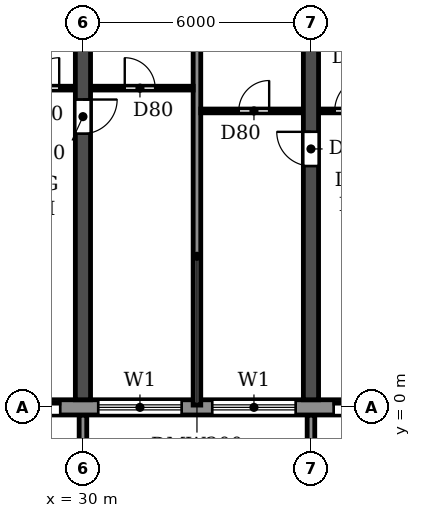
"""IFC4 building model, lengths in metres.
Left out: names, types, materials, properties, quantities, classifications, styles, units other than length and angle.
Written with IfcOpenShell. Run it as: python <this file> out.ifc"""

import sys

from ifc_helpers import new_model, si_unit, direction, frame, frame_2d, origin, place, context, subcontext, project, spatial, polyline, rectangle, outline, extrude, source, transform, mapped, element, fill, save


model = new_model("IFC4")
c1 = context("Model", 3, precision=1e-05, world=origin(), true_north=direction((0.0, 1.0)))
c2 = subcontext(c1, "Body", "Model", "MODEL_VIEW")
j1 = project(units=[si_unit("LENGTHUNIT", "METRE"), si_unit("PLANEANGLEUNIT", "RADIAN")], contexts=[c1])
p1 = place(None, origin())
s1 = spatial("IfcSite", under=j1, at=p1, CompositionType="ELEMENT")
p2 = place(p1, origin())
s2 = spatial("IfcBuilding", under=s1, at=p2, CompositionType="ELEMENT")
p3 = place(p2, frame((0.0, 0.0, 63.0)))
s3 = spatial("IfcBuildingStorey", under=s2, at=p3, CompositionType="ELEMENT", Elevation=63.0)
p4 = place(p3, frame((30.0, 0.2, 0.0), z_axis=(0.0, 0.0, 1.0), x_axis=(0.0, 1.0, 0.0)))
e1 = element("IfcWall", 1, at=p4, inside=s3, PredefinedType="SHEAR", context=c2, shape_type="SweptSolid", body=[
    extrude(rectangle(XDim=11.65, YDim=0.4, at=frame_2d((5.825, 0.0))), origin(), (0.0, 0.0, 1.0), 2.95),
])
p5 = place(p4, frame((7.0, 0.0, 0.0)))
e2 = element("IfcOpeningElement", 2, at=p5, cuts=e1, PredefinedType="OPENING", context=c2, shape_type="SweptSolid", body=[
    extrude(rectangle(XDim=0.9, YDim=2.1, at=frame_2d((0.45, 1.05))), frame((0.0, 0.21, 0.0), z_axis=(0.0, -1.0, 0.0), x_axis=(1.0, 0.0, 0.0)), (0.0, 0.0, 1.0), 0.42),
])
p6 = place(p3, frame((36.0, 0.2, 0.0), z_axis=(0.0, 0.0, 1.0), x_axis=(0.0, 1.0, 0.0)))
e3 = element("IfcWall", 3, at=p6, inside=s3, PredefinedType="SHEAR", context=c2, shape_type="SweptSolid", body=[
    extrude(rectangle(XDim=11.65, YDim=0.4, at=frame_2d((5.825, 0.0))), origin(), (0.0, 0.0, 1.0), 2.95),
])
p7 = place(p6, frame((6.15, 0.0, 0.0)))
e4 = element("IfcOpeningElement", 4, at=p7, cuts=e3, PredefinedType="OPENING", context=c2, shape_type="SweptSolid", body=[
    extrude(rectangle(XDim=0.9, YDim=2.1, at=frame_2d((0.45, 1.05))), frame((0.0, 0.21, 0.0), z_axis=(0.0, -1.0, 0.0), x_axis=(1.0, 0.0, 0.0)), (0.0, 0.0, 1.0), 0.42),
])
p8 = place(p3, frame((10.683, 0.0, 0.0), z_axis=(0.0, 0.0, 1.0), x_axis=(1.0, 0.0, 0.0)))
e5 = element("IfcWall", 5, at=p8, inside=s3, PredefinedType="STANDARD", context=c2, shape_type="SweptSolid", body=[
    extrude(rectangle(XDim=80.634, YDim=0.4, at=frame_2d((40.317, 0.0))), origin(), (0.0, 0.0, 1.0), 2.95),
])
p9 = place(p8, frame((1.717, 0.0, 0.9)))
e6 = element("IfcOpeningElement", 6, at=p9, cuts=e5, PredefinedType="OPENING", context=c2, shape_type="SweptSolid", body=[
    extrude(rectangle(XDim=2.2, YDim=1.5, at=frame_2d((1.1, 0.75))), frame((0.0, 0.21, 0.0), z_axis=(0.0, -1.0, 0.0), x_axis=(1.0, 0.0, 0.0)), (0.0, 0.0, 1.0), 0.42),
])
p10 = place(p8, frame((4.917, 0.0, 0.0)))
e7 = element("IfcOpeningElement", 7, at=p10, cuts=e5, PredefinedType="OPENING", context=c2, shape_type="SweptSolid", body=[
    extrude(rectangle(XDim=1.8, YDim=2.4, at=frame_2d((0.9, 1.2))), frame((0.0, 0.21, 0.0), z_axis=(0.0, -1.0, 0.0), x_axis=(1.0, 0.0, 0.0)), (0.0, 0.0, 1.0), 0.42),
])
p11 = place(p8, frame((7.717, 0.0, 0.9)))
e8 = element("IfcOpeningElement", 8, at=p11, cuts=e5, PredefinedType="OPENING", context=c2, shape_type="SweptSolid", body=[
    extrude(rectangle(XDim=2.2, YDim=1.5, at=frame_2d((1.1, 0.75))), frame((0.0, 0.21, 0.0), z_axis=(0.0, -1.0, 0.0), x_axis=(1.0, 0.0, 0.0)), (0.0, 0.0, 1.0), 0.42),
])
p12 = place(p8, frame((10.717, 0.0, 0.9)))
e9 = element("IfcOpeningElement", 9, at=p12, cuts=e5, PredefinedType="OPENING", context=c2, shape_type="SweptSolid", body=[
    extrude(rectangle(XDim=2.2, YDim=1.5, at=frame_2d((1.1, 0.75))), frame((0.0, 0.21, 0.0), z_axis=(0.0, -1.0, 0.0), x_axis=(1.0, 0.0, 0.0)), (0.0, 0.0, 1.0), 0.42),
])
p13 = place(p8, frame((13.717, 0.0, 0.9)))
e10 = element("IfcOpeningElement", 10, at=p13, cuts=e5, PredefinedType="OPENING", context=c2, shape_type="SweptSolid", body=[
    extrude(rectangle(XDim=2.2, YDim=1.5, at=frame_2d((1.1, 0.75))), frame((0.0, 0.21, 0.0), z_axis=(0.0, -1.0, 0.0), x_axis=(1.0, 0.0, 0.0)), (0.0, 0.0, 1.0), 0.42),
])
p14 = place(p8, frame((16.917, 0.0, 0.0)))
e11 = element("IfcOpeningElement", 11, at=p14, cuts=e5, PredefinedType="OPENING", context=c2, shape_type="SweptSolid", body=[
    extrude(rectangle(XDim=1.8, YDim=2.4, at=frame_2d((0.9, 1.2))), frame((0.0, 0.21, 0.0), z_axis=(0.0, -1.0, 0.0), x_axis=(1.0, 0.0, 0.0)), (0.0, 0.0, 1.0), 0.42),
])
p15 = place(p8, frame((19.717, 0.0, 0.9)))
e12 = element("IfcOpeningElement", 12, at=p15, cuts=e5, PredefinedType="OPENING", context=c2, shape_type="SweptSolid", body=[
    extrude(rectangle(XDim=2.2, YDim=1.5, at=frame_2d((1.1, 0.75))), frame((0.0, 0.21, 0.0), z_axis=(0.0, -1.0, 0.0), x_axis=(1.0, 0.0, 0.0)), (0.0, 0.0, 1.0), 0.42),
])
p16 = place(p8, frame((22.717, 0.0, 0.9)))
e13 = element("IfcOpeningElement", 13, at=p16, cuts=e5, PredefinedType="OPENING", context=c2, shape_type="SweptSolid", body=[
    extrude(rectangle(XDim=2.2, YDim=1.5, at=frame_2d((1.1, 0.75))), frame((0.0, 0.21, 0.0), z_axis=(0.0, -1.0, 0.0), x_axis=(1.0, 0.0, 0.0)), (0.0, 0.0, 1.0), 0.42),
])
p17 = place(p8, frame((25.917, 0.0, 0.0)))
e14 = element("IfcOpeningElement", 14, at=p17, cuts=e5, PredefinedType="OPENING", context=c2, shape_type="SweptSolid", body=[
    extrude(rectangle(XDim=1.8, YDim=2.4, at=frame_2d((0.9, 1.2))), frame((0.0, 0.21, 0.0), z_axis=(0.0, -1.0, 0.0), x_axis=(1.0, 0.0, 0.0)), (0.0, 0.0, 1.0), 0.42),
])
p18 = place(p8, frame((28.717, 0.0, 0.9)))
e15 = element("IfcOpeningElement", 15, at=p18, cuts=e5, PredefinedType="OPENING", context=c2, shape_type="SweptSolid", body=[
    extrude(rectangle(XDim=2.2, YDim=1.5, at=frame_2d((1.1, 0.75))), frame((0.0, 0.21, 0.0), z_axis=(0.0, -1.0, 0.0), x_axis=(1.0, 0.0, 0.0)), (0.0, 0.0, 1.0), 0.42),
])
p19 = place(p8, frame((31.717, 0.0, 0.9)))
e16 = element("IfcOpeningElement", 16, at=p19, cuts=e5, PredefinedType="OPENING", context=c2, shape_type="SweptSolid", body=[
    extrude(rectangle(XDim=2.2, YDim=1.5, at=frame_2d((1.1, 0.75))), frame((0.0, 0.21, 0.0), z_axis=(0.0, -1.0, 0.0), x_axis=(1.0, 0.0, 0.0)), (0.0, 0.0, 1.0), 0.42),
])
p20 = place(p8, frame((34.717, 0.0, 0.9)))
e17 = element("IfcOpeningElement", 17, at=p20, cuts=e5, PredefinedType="OPENING", context=c2, shape_type="SweptSolid", body=[
    extrude(rectangle(XDim=2.2, YDim=1.5, at=frame_2d((1.1, 0.75))), frame((0.0, 0.21, 0.0), z_axis=(0.0, -1.0, 0.0), x_axis=(1.0, 0.0, 0.0)), (0.0, 0.0, 1.0), 0.42),
])
p21 = place(p8, frame((37.717, 0.0, 0.9)))
e18 = element("IfcOpeningElement", 18, at=p21, cuts=e5, PredefinedType="OPENING", context=c2, shape_type="SweptSolid", body=[
    extrude(rectangle(XDim=2.2, YDim=1.5, at=frame_2d((1.1, 0.75))), frame((0.0, 0.21, 0.0), z_axis=(0.0, -1.0, 0.0), x_axis=(1.0, 0.0, 0.0)), (0.0, 0.0, 1.0), 0.42),
])
p22 = place(p8, frame((40.917, 0.0, 0.0)))
e19 = element("IfcOpeningElement", 19, at=p22, cuts=e5, PredefinedType="OPENING", context=c2, shape_type="SweptSolid", body=[
    extrude(rectangle(XDim=1.8, YDim=2.4, at=frame_2d((0.9, 1.2))), frame((0.0, 0.21, 0.0), z_axis=(0.0, -1.0, 0.0), x_axis=(1.0, 0.0, 0.0)), (0.0, 0.0, 1.0), 0.42),
])
p23 = place(p8, frame((43.717, 0.0, 0.9)))
e20 = element("IfcOpeningElement", 20, at=p23, cuts=e5, PredefinedType="OPENING", context=c2, shape_type="SweptSolid", body=[
    extrude(rectangle(XDim=2.2, YDim=1.5, at=frame_2d((1.1, 0.75))), frame((0.0, 0.21, 0.0), z_axis=(0.0, -1.0, 0.0), x_axis=(1.0, 0.0, 0.0)), (0.0, 0.0, 1.0), 0.42),
])
p24 = place(p8, frame((46.717, 0.0, 0.9)))
e21 = element("IfcOpeningElement", 21, at=p24, cuts=e5, PredefinedType="OPENING", context=c2, shape_type="SweptSolid", body=[
    extrude(rectangle(XDim=2.2, YDim=1.5, at=frame_2d((1.1, 0.75))), frame((0.0, 0.21, 0.0), z_axis=(0.0, -1.0, 0.0), x_axis=(1.0, 0.0, 0.0)), (0.0, 0.0, 1.0), 0.42),
])
p25 = place(p8, frame((49.717, 0.0, 0.9)))
e22 = element("IfcOpeningElement", 22, at=p25, cuts=e5, PredefinedType="OPENING", context=c2, shape_type="SweptSolid", body=[
    extrude(rectangle(XDim=2.2, YDim=1.5, at=frame_2d((1.1, 0.75))), frame((0.0, 0.21, 0.0), z_axis=(0.0, -1.0, 0.0), x_axis=(1.0, 0.0, 0.0)), (0.0, 0.0, 1.0), 0.42),
])
p26 = place(p8, frame((52.717, 0.0, 0.9)))
e23 = element("IfcOpeningElement", 23, at=p26, cuts=e5, PredefinedType="OPENING", context=c2, shape_type="SweptSolid", body=[
    extrude(rectangle(XDim=2.2, YDim=1.5, at=frame_2d((1.1, 0.75))), frame((0.0, 0.21, 0.0), z_axis=(0.0, -1.0, 0.0), x_axis=(1.0, 0.0, 0.0)), (0.0, 0.0, 1.0), 0.42),
])
p27 = place(p8, frame((55.717, 0.0, 0.9)))
e24 = element("IfcOpeningElement", 24, at=p27, cuts=e5, PredefinedType="OPENING", context=c2, shape_type="SweptSolid", body=[
    extrude(rectangle(XDim=2.2, YDim=1.5, at=frame_2d((1.1, 0.75))), frame((0.0, 0.21, 0.0), z_axis=(0.0, -1.0, 0.0), x_axis=(1.0, 0.0, 0.0)), (0.0, 0.0, 1.0), 0.42),
])
p28 = place(p8, frame((58.717, 0.0, 0.9)))
e25 = element("IfcOpeningElement", 25, at=p28, cuts=e5, PredefinedType="OPENING", context=c2, shape_type="SweptSolid", body=[
    extrude(rectangle(XDim=2.2, YDim=1.5, at=frame_2d((1.1, 0.75))), frame((0.0, 0.21, 0.0), z_axis=(0.0, -1.0, 0.0), x_axis=(1.0, 0.0, 0.0)), (0.0, 0.0, 1.0), 0.42),
])
p29 = place(p8, frame((61.717, 0.0, 0.9)))
e26 = element("IfcOpeningElement", 26, at=p29, cuts=e5, PredefinedType="OPENING", context=c2, shape_type="SweptSolid", body=[
    extrude(rectangle(XDim=2.2, YDim=1.5, at=frame_2d((1.1, 0.75))), frame((0.0, 0.21, 0.0), z_axis=(0.0, -1.0, 0.0), x_axis=(1.0, 0.0, 0.0)), (0.0, 0.0, 1.0), 0.42),
])
p30 = place(p8, frame((64.917, 0.0, 0.0)))
e27 = element("IfcOpeningElement", 27, at=p30, cuts=e5, PredefinedType="OPENING", context=c2, shape_type="SweptSolid", body=[
    extrude(rectangle(XDim=1.8, YDim=2.4, at=frame_2d((0.9, 1.2))), frame((0.0, 0.21, 0.0), z_axis=(0.0, -1.0, 0.0), x_axis=(1.0, 0.0, 0.0)), (0.0, 0.0, 1.0), 0.42),
])
p31 = place(p8, frame((67.717, 0.0, 0.9)))
e28 = element("IfcOpeningElement", 28, at=p31, cuts=e5, PredefinedType="OPENING", context=c2, shape_type="SweptSolid", body=[
    extrude(rectangle(XDim=2.2, YDim=1.5, at=frame_2d((1.1, 0.75))), frame((0.0, 0.21, 0.0), z_axis=(0.0, -1.0, 0.0), x_axis=(1.0, 0.0, 0.0)), (0.0, 0.0, 1.0), 0.42),
])
p32 = place(p8, frame((70.717, 0.0, 0.9)))
e29 = element("IfcOpeningElement", 29, at=p32, cuts=e5, PredefinedType="OPENING", context=c2, shape_type="SweptSolid", body=[
    extrude(rectangle(XDim=2.2, YDim=1.5, at=frame_2d((1.1, 0.75))), frame((0.0, 0.21, 0.0), z_axis=(0.0, -1.0, 0.0), x_axis=(1.0, 0.0, 0.0)), (0.0, 0.0, 1.0), 0.42),
])
p33 = place(p8, frame((73.717, 0.0, 0.9)))
e30 = element("IfcOpeningElement", 30, at=p33, cuts=e5, PredefinedType="OPENING", context=c2, shape_type="SweptSolid", body=[
    extrude(rectangle(XDim=2.2, YDim=1.5, at=frame_2d((1.1, 0.75))), frame((0.0, 0.21, 0.0), z_axis=(0.0, -1.0, 0.0), x_axis=(1.0, 0.0, 0.0)), (0.0, 0.0, 1.0), 0.42),
])
p34 = place(p8, frame((76.917, 0.0, 0.0)))
e31 = element("IfcOpeningElement", 31, at=p34, cuts=e5, PredefinedType="OPENING", context=c2, shape_type="SweptSolid", body=[
    extrude(rectangle(XDim=1.8, YDim=2.4, at=frame_2d((0.9, 1.2))), frame((0.0, 0.21, 0.0), z_axis=(0.0, -1.0, 0.0), x_axis=(1.0, 0.0, 0.0)), (0.0, 0.0, 1.0), 0.42),
])
m1 = source(origin(), c2, "Body", "SweptSolid", [
    extrude(outline(polyline([(0.0, 0.0), (0.2, 0.0), (0.2, 1.65), (0.0, 1.65), (0.0, 0.0)])), origin(), (0.0, 0.0, 1.0), 3.1),
])
for number, where in (
    (32, (29.9, -1.85, 0.0)),
    (33, (35.9, -1.85, 0.0)),
):
    element("IfcWall", number, at=place(p3, frame(where)), inside=s3, PredefinedType="STANDARD", context=c2, shape_type="MappedRepresentation", body=[
        mapped(m1, transform((0.0, 0.0, 0.0))),
    ])
p35 = place(p3, frame((33.0, 0.06, 0.0), z_axis=(0.0, 0.0, 1.0), x_axis=(0.0, 1.0, 0.0)))
e34 = element("IfcWall", 34, at=p35, inside=s3, PredefinedType="PARTITIONING", context=c2, shape_type="SweptSolid", body=[
    extrude(rectangle(XDim=11.78, YDim=0.2, at=frame_2d((5.89, 0.0))), origin(), (0.0, 0.0, 1.0), 2.95),
])
p36 = place(p3, frame((33.1, 7.8, 0.0), z_axis=(0.0, 0.0, 1.0), x_axis=(1.0, 0.0, 0.0)))
e35 = element("IfcWall", 35, at=p36, inside=s3, PredefinedType="PARTITIONING", context=c2, shape_type="SweptSolid", body=[
    extrude(rectangle(XDim=2.69, YDim=0.1, at=frame_2d((1.345, 0.0))), origin(), (0.0, 0.0, 1.0), 2.95),
])
p37 = place(p36, frame((1.0, 0.0, 0.0)))
e36 = element("IfcOpeningElement", 36, at=p37, cuts=e35, PredefinedType="OPENING", context=c2, shape_type="SweptSolid", body=[
    extrude(rectangle(XDim=0.8, YDim=2.1, at=frame_2d((0.4, 1.05))), frame((0.0, 0.06, 0.0), z_axis=(0.0, -1.0, 0.0), x_axis=(1.0, 0.0, 0.0)), (0.0, 0.0, 1.0), 0.12),
])
p38 = place(p3, frame((36.21, 7.8, 0.0), z_axis=(0.0, 0.0, 1.0), x_axis=(1.0, 0.0, 0.0)))
e37 = element("IfcWall", 37, at=p38, inside=s3, PredefinedType="PARTITIONING", context=c2, shape_type="SweptSolid", body=[
    extrude(rectangle(XDim=1.99, YDim=0.1, at=frame_2d((0.995, 0.0))), origin(), (0.0, 0.0, 1.0), 2.95),
])
p39 = place(p38, frame((0.415, 0.0, 0.0)))
e38 = element("IfcOpeningElement", 38, at=p39, cuts=e37, PredefinedType="OPENING", context=c2, shape_type="SweptSolid", body=[
    extrude(rectangle(XDim=0.9, YDim=2.1, at=frame_2d((0.45, 1.05))), frame((0.0, 0.06, 0.0), z_axis=(0.0, -1.0, 0.0), x_axis=(1.0, 0.0, 0.0)), (0.0, 0.0, 1.0), 0.12),
])
p40 = place(p3, frame((27.9, 8.4, 0.0), z_axis=(0.0, 0.0, 1.0), x_axis=(1.0, 0.0, 0.0)))
e39 = element("IfcWall", 39, at=p40, inside=s3, PredefinedType="PARTITIONING", context=c2, shape_type="SweptSolid", body=[
    extrude(rectangle(XDim=1.89, YDim=0.1, at=frame_2d((0.945, 0.0))), origin(), (0.0, 0.0, 1.0), 2.95),
])
p41 = place(p40, frame((0.675, 0.0, 0.0)))
e40 = element("IfcOpeningElement", 40, at=p41, cuts=e39, PredefinedType="OPENING", context=c2, shape_type="SweptSolid", body=[
    extrude(rectangle(XDim=0.8, YDim=2.1, at=frame_2d((0.4, 1.05))), frame((0.0, 0.06, 0.0), z_axis=(0.0, -1.0, 0.0), x_axis=(1.0, 0.0, 0.0)), (0.0, 0.0, 1.0), 0.12),
])
p42 = place(p3, frame((30.21, 8.4, 0.0), z_axis=(0.0, 0.0, 1.0), x_axis=(1.0, 0.0, 0.0)))
e41 = element("IfcWall", 41, at=p42, inside=s3, PredefinedType="PARTITIONING", context=c2, shape_type="SweptSolid", body=[
    extrude(rectangle(XDim=2.69, YDim=0.1, at=frame_2d((1.345, 0.0))), origin(), (0.0, 0.0, 1.0), 2.95),
])
p43 = place(p42, frame((0.89, 0.0, 0.0)))
e42 = element("IfcOpeningElement", 42, at=p43, cuts=e41, PredefinedType="OPENING", context=c2, shape_type="SweptSolid", body=[
    extrude(rectangle(XDim=0.8, YDim=2.1, at=frame_2d((0.4, 1.05))), frame((0.0, 0.06, 0.0), z_axis=(0.0, -1.0, 0.0), x_axis=(1.0, 0.0, 0.0)), (0.0, 0.0, 1.0), 0.12),
])
p44 = place(p14, origin())
e43 = element("IfcDoor", 43, at=p44, inside=s3, OperationType="DOUBLE_DOOR_SLIDING", PredefinedType="DOOR", context=c2, shape_type="SweptSolid", body=[
    extrude(rectangle(XDim=1.8, YDim=2.4, at=frame_2d((0.9, 1.2))), frame((0.0, 0.025, 0.0), z_axis=(0.0, -1.0, 0.0), x_axis=(1.0, 0.0, 0.0)), (0.0, 0.0, 1.0), 0.05),
])
fill(e11, e43)
p45 = place(p15, origin())
e44 = element("IfcWindow", 44, at=p45, inside=s3, PartitioningType="DOUBLE_PANEL_HORIZONTAL", PredefinedType="WINDOW", context=c2, shape_type="SweptSolid", body=[
    extrude(rectangle(XDim=2.2, YDim=1.5, at=frame_2d((1.1, 0.75))), frame((0.0, 0.03, 0.0), z_axis=(0.0, -1.0, 0.0), x_axis=(1.0, 0.0, 0.0)), (0.0, 0.0, 1.0), 0.06),
])
fill(e12, e44)
p46 = place(p16, origin())
e45 = element("IfcWindow", 45, at=p46, inside=s3, PartitioningType="DOUBLE_PANEL_HORIZONTAL", PredefinedType="WINDOW", context=c2, shape_type="SweptSolid", body=[
    extrude(rectangle(XDim=2.2, YDim=1.5, at=frame_2d((1.1, 0.75))), frame((0.0, 0.03, 0.0), z_axis=(0.0, -1.0, 0.0), x_axis=(1.0, 0.0, 0.0)), (0.0, 0.0, 1.0), 0.06),
])
fill(e13, e45)
p47 = place(p17, origin())
e46 = element("IfcDoor", 46, at=p47, inside=s3, OperationType="DOUBLE_DOOR_SLIDING", PredefinedType="DOOR", context=c2, shape_type="SweptSolid", body=[
    extrude(rectangle(XDim=1.8, YDim=2.4, at=frame_2d((0.9, 1.2))), frame((0.0, 0.025, 0.0), z_axis=(0.0, -1.0, 0.0), x_axis=(1.0, 0.0, 0.0)), (0.0, 0.0, 1.0), 0.05),
])
fill(e14, e46)
p48 = place(p43, origin())
e47 = element("IfcDoor", 47, at=p48, inside=s3, OperationType="SINGLE_SWING_LEFT", PredefinedType="DOOR", context=c2, shape_type="SweptSolid", body=[
    extrude(rectangle(XDim=0.8, YDim=2.1, at=frame_2d((0.4, 1.05))), frame((0.0, 0.025, 0.0), z_axis=(0.0, -1.0, 0.0), x_axis=(1.0, 0.0, 0.0)), (0.0, 0.0, 1.0), 0.05),
])
fill(e42, e47)
p49 = place(p41, origin())
e48 = element("IfcDoor", 48, at=p49, inside=s3, OperationType="SINGLE_SWING_RIGHT", PredefinedType="DOOR", context=c2, shape_type="SweptSolid", body=[
    extrude(rectangle(XDim=0.8, YDim=2.1, at=frame_2d((0.4, 1.05))), frame((0.0, 0.025, 0.0), z_axis=(0.0, -1.0, 0.0), x_axis=(1.0, 0.0, 0.0)), (0.0, 0.0, 1.0), 0.05),
])
fill(e40, e48)
p50 = place(p5, frame((0.9, 0.0, 0.0), z_axis=(0.0, 0.0, 1.0), x_axis=(-1.0, 0.0, 0.0)))
e49 = element("IfcDoor", 49, at=p50, inside=s3, OperationType="SINGLE_SWING_LEFT", PredefinedType="DOOR", context=c2, shape_type="SweptSolid", body=[
    extrude(rectangle(XDim=0.9, YDim=2.1, at=frame_2d((0.45, 1.05))), frame((0.0, 0.025, 0.0), z_axis=(0.0, -1.0, 0.0), x_axis=(1.0, 0.0, 0.0)), (0.0, 0.0, 1.0), 0.05),
])
fill(e2, e49)
p51 = place(p37, origin())
e50 = element("IfcDoor", 50, at=p51, inside=s3, OperationType="SINGLE_SWING_RIGHT", PredefinedType="DOOR", context=c2, shape_type="SweptSolid", body=[
    extrude(rectangle(XDim=0.8, YDim=2.1, at=frame_2d((0.4, 1.05))), frame((0.0, 0.025, 0.0), z_axis=(0.0, -1.0, 0.0), x_axis=(1.0, 0.0, 0.0)), (0.0, 0.0, 1.0), 0.05),
])
fill(e36, e50)
p52 = place(p7, origin())
e51 = element("IfcDoor", 51, at=p52, inside=s3, OperationType="SINGLE_SWING_RIGHT", PredefinedType="DOOR", context=c2, shape_type="SweptSolid", body=[
    extrude(rectangle(XDim=0.9, YDim=2.1, at=frame_2d((0.45, 1.05))), frame((0.0, 0.025, 0.0), z_axis=(0.0, -1.0, 0.0), x_axis=(1.0, 0.0, 0.0)), (0.0, 0.0, 1.0), 0.05),
])
fill(e4, e51)
p53 = place(p39, origin())
e52 = element("IfcDoor", 52, at=p53, inside=s3, OperationType="SINGLE_SWING_RIGHT", PredefinedType="DOOR", context=c2, shape_type="SweptSolid", body=[
    extrude(rectangle(XDim=0.9, YDim=2.1, at=frame_2d((0.45, 1.05))), frame((0.0, 0.025, 0.0), z_axis=(0.0, -1.0, 0.0), x_axis=(1.0, 0.0, 0.0)), (0.0, 0.0, 1.0), 0.05),
])
fill(e38, e52)
save(model, sys.argv[1])
